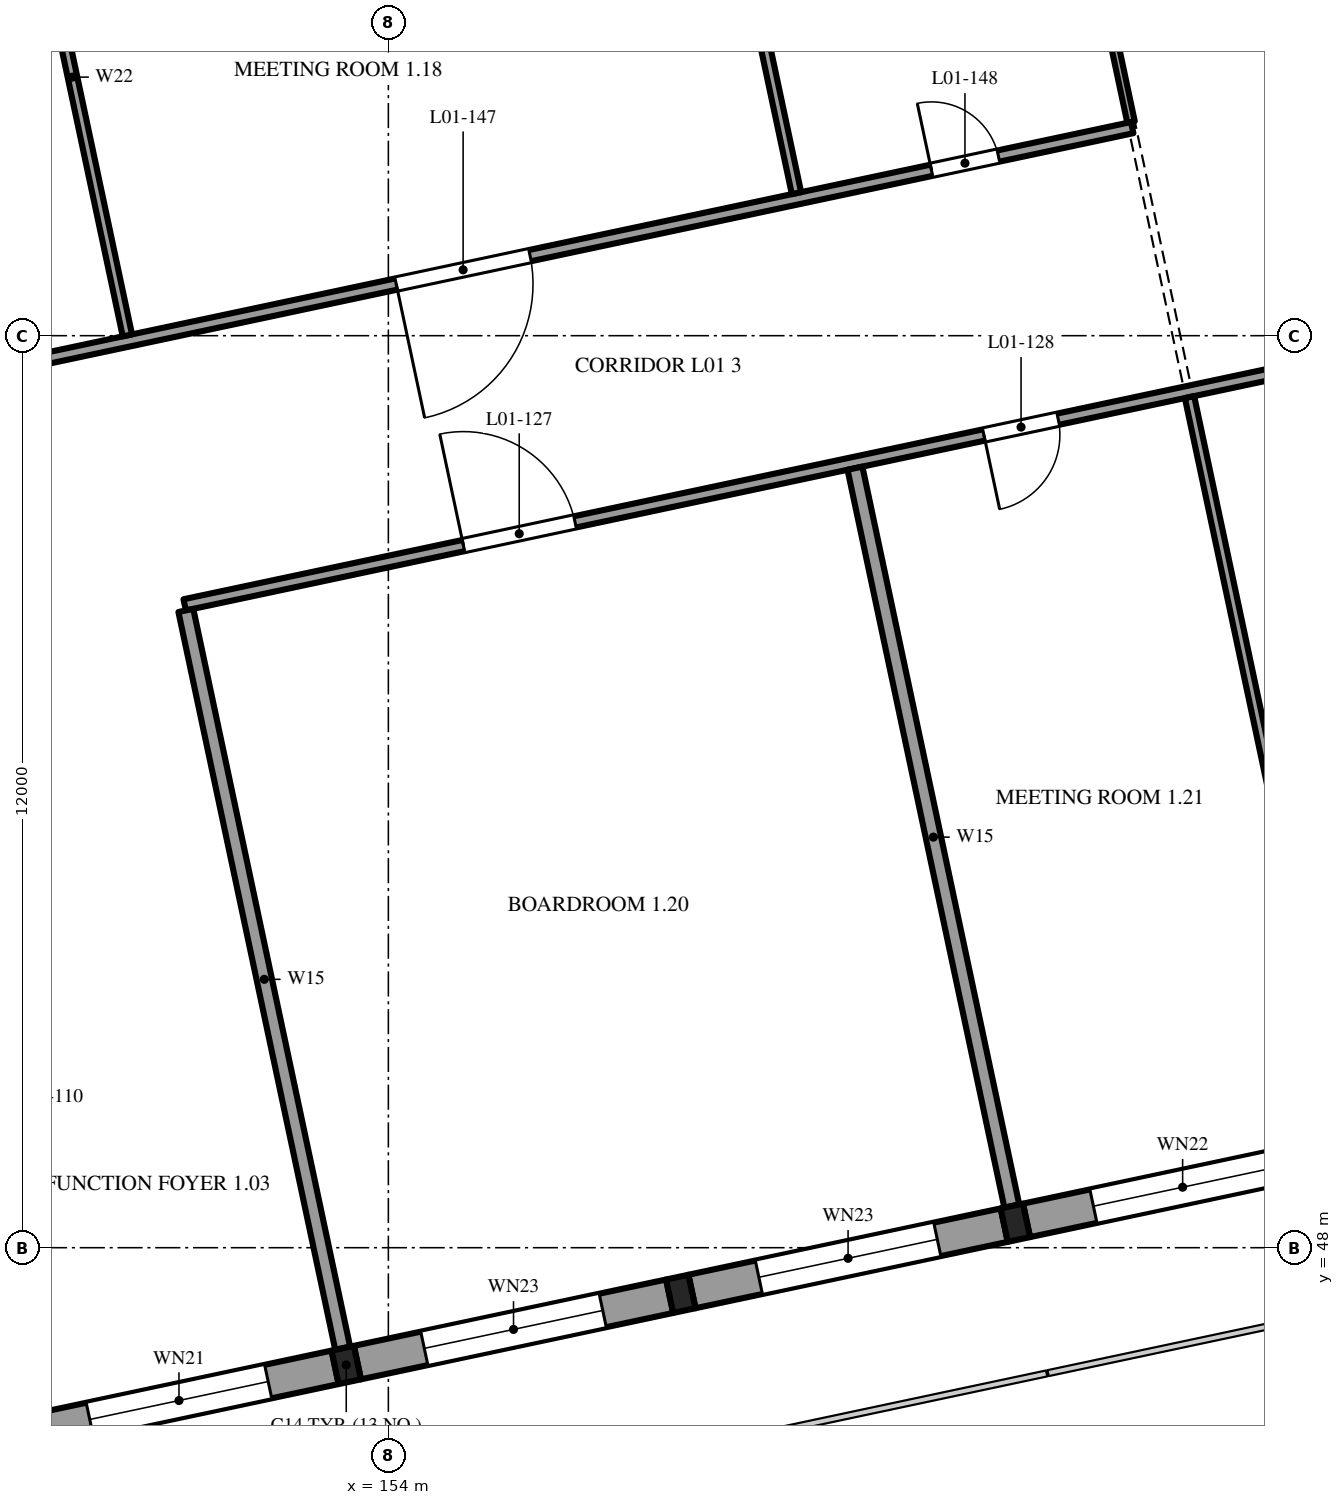
"""IFC4 building model, lengths in metres.
Left out: names, types, materials, properties, quantities, classifications, styles, units other than length and angle.
Written with IfcOpenShell. Run it as: python <this file> out.ifc"""

import sys

from ifc_helpers import new_model, si_unit, direction, frame, frame_2d, origin, origin_2d, place, context, subcontext, project, spatial, rectangle, i_section, extrude, element, fill, save


model = new_model("IFC4")
c1 = context("Model", 3, precision=1e-05, world=origin(), true_north=direction((0.0, 1.0)))
c2 = subcontext(c1, "Body", "Model", "MODEL_VIEW")
j1 = project(units=[si_unit("LENGTHUNIT", "METRE"), si_unit("PLANEANGLEUNIT", "RADIAN")], contexts=[c1])
p1 = place(None, origin())
s1 = spatial("IfcSite", under=j1, at=p1, CompositionType="ELEMENT")
p2 = place(p1, origin())
s2 = spatial("IfcBuilding", under=s1, at=p2, CompositionType="ELEMENT")
p3 = place(p2, frame((0.0, 0.0, 7.2)))
s3 = spatial("IfcBuildingStorey", under=s2, at=p3, CompositionType="ELEMENT", Elevation=7.2)
for number, where, z_axis, x_axis in (
    (1, (153.446, 46.457, 0.0), (0.0, 0.0, 1.0), (0.978, 0.208, 0.0)),
    (2, (157.848, 47.393, 0.0), (0.0, 0.0, 1.0), (0.978, 0.208, 0.0)),
    (3, (162.249, 48.328, 0.0), (0.0, 0.0, 1.0), (0.978, 0.208, 0.0)),
):
    element("IfcColumn", number, at=place(p3, frame(where, z_axis=z_axis, x_axis=x_axis)), inside=s3, PredefinedType="COLUMN", context=c2, shape_type="SweptSolid", body=[
        extrude(i_section(OverallWidth=0.3, OverallDepth=0.45, WebThickness=0.014, FlangeThickness=0.026, FilletRadius=0.027, at=origin_2d()), origin(), (0.0, 0.0, 1.0), 4.8),
    ])
p4 = place(p3, frame((149.191, 45.552, 0.0), z_axis=(0.0, 0.0, 1.0), x_axis=(0.978146440129, 0.207917150959, 0.0)))
e4 = element("IfcWall", 4, at=p4, inside=s3, PredefinedType="SOLIDWALL", context=c2, shape_type="SweptSolid", body=[
    extrude(rectangle(XDim=4.2, YDim=0.45, at=frame_2d((2.1, 0.0))), origin(), (0.0, 0.0, 1.0), 4.35),
])
p5 = place(p4, frame((0.9, 0.0, 0.45)))
e5 = element("IfcOpeningElement", 5, at=p5, cuts=e4, PredefinedType="OPENING", context=c2, shape_type="SweptSolid", body=[
    extrude(rectangle(XDim=2.4, YDim=3.3, at=frame_2d((1.2, 1.65))), frame((0.0, 0.235, 0.0), z_axis=(0.0, -1.0, 0.0), x_axis=(1.0, 0.0, 0.0)), (0.0, 0.0, 1.0), 0.47),
])
p6 = place(p3, frame((153.593, 46.488, 0.0), z_axis=(0.0, 0.0, 1.0), x_axis=(0.978143927149, 0.207928972925, 0.0)))
e6 = element("IfcWall", 6, at=p6, inside=s3, PredefinedType="SOLIDWALL", context=c2, shape_type="SweptSolid", body=[
    extrude(rectangle(XDim=4.2, YDim=0.45, at=frame_2d((2.1, 0.0))), origin(), (0.0, 0.0, 1.0), 4.35),
])
p7 = place(p6, frame((0.9, 0.0, 0.6)))
e7 = element("IfcOpeningElement", 7, at=p7, cuts=e6, PredefinedType="OPENING", context=c2, shape_type="SweptSolid", body=[
    extrude(rectangle(XDim=2.4, YDim=2.7, at=frame_2d((1.2, 1.35))), frame((0.0, 0.235, 0.0), z_axis=(0.0, -1.0, 0.0), x_axis=(1.0, 0.0, 0.0)), (0.0, 0.0, 1.0), 0.47),
])
p8 = place(p3, frame((157.994, 47.424, 0.0), z_axis=(0.0, 0.0, 1.0), x_axis=(0.978143927149, 0.207928972925, 0.0)))
e8 = element("IfcWall", 8, at=p8, inside=s3, PredefinedType="SOLIDWALL", context=c2, shape_type="SweptSolid", body=[
    extrude(rectangle(XDim=4.2, YDim=0.45, at=frame_2d((2.1, 0.0))), origin(), (0.0, 0.0, 1.0), 4.35),
])
p9 = place(p8, frame((0.9, 0.0, 0.6)))
e9 = element("IfcOpeningElement", 9, at=p9, cuts=e8, PredefinedType="OPENING", context=c2, shape_type="SweptSolid", body=[
    extrude(rectangle(XDim=2.4, YDim=2.7, at=frame_2d((1.2, 1.35))), frame((0.0, 0.235, 0.0), z_axis=(0.0, -1.0, 0.0), x_axis=(1.0, 0.0, 0.0)), (0.0, 0.0, 1.0), 0.47),
])
p10 = place(p3, frame((162.396, 48.359, 0.0), z_axis=(0.0, 0.0, 1.0), x_axis=(0.978155748334, 0.207873355681, 0.0)))
e10 = element("IfcWall", 10, at=p10, inside=s3, PredefinedType="SOLIDWALL", context=c2, shape_type="SweptSolid", body=[
    extrude(rectangle(XDim=4.2, YDim=0.45, at=frame_2d((2.1, 0.0))), origin(), (0.0, 0.0, 1.0), 4.35),
])
p11 = place(p10, frame((0.9, 0.0, 0.9)))
e11 = element("IfcOpeningElement", 11, at=p11, cuts=e10, PredefinedType="OPENING", context=c2, shape_type="SweptSolid", body=[
    extrude(rectangle(XDim=2.4, YDim=2.4, at=frame_2d((1.2, 1.2))), frame((0.0, 0.235, 0.0), z_axis=(0.0, -1.0, 0.0), x_axis=(1.0, 0.0, 0.0)), (0.0, 0.0, 1.0), 0.47),
])
p12 = place(p3, frame((151.32, 56.458, 0.0), z_axis=(0.0, 0.0, 1.0), x_axis=(0.97814787394, 0.207910405482, 0.0)))
e12 = element("IfcWall", 12, at=p12, inside=s3, PredefinedType="PARTITIONING", context=c2, shape_type="SweptSolid", body=[
    extrude(rectangle(XDim=45.0, YDim=0.15, at=frame_2d((22.5, 0.0))), origin(), (0.0, 0.0, 1.0), 3.75),
])
p13 = place(p12, frame((3.75, 0.0, 0.0)))
e13 = element("IfcOpeningElement", 13, at=p13, cuts=e12, PredefinedType="OPENING", context=c2, shape_type="SweptSolid", body=[
    extrude(rectangle(XDim=1.5, YDim=2.1, at=frame_2d((0.75, 1.05))), frame((0.0, 0.085, 0.0), z_axis=(0.0, -1.0, 0.0), x_axis=(1.0, 0.0, 0.0)), (0.0, 0.0, 1.0), 0.17),
])
p14 = place(p12, frame((10.75, 0.0, 0.0)))
e14 = element("IfcOpeningElement", 14, at=p14, cuts=e12, PredefinedType="OPENING", context=c2, shape_type="SweptSolid", body=[
    extrude(rectangle(XDim=1.0, YDim=2.1, at=frame_2d((0.5, 1.05))), frame((0.0, 0.085, 0.0), z_axis=(0.0, -1.0, 0.0), x_axis=(1.0, 0.0, 0.0)), (0.0, 0.0, 1.0), 0.17),
])
p15 = place(p12, frame((15.25, 0.0, 0.0)))
e15 = element("IfcOpeningElement", 15, at=p15, cuts=e12, PredefinedType="OPENING", context=c2, shape_type="SweptSolid", body=[
    extrude(rectangle(XDim=1.0, YDim=2.1, at=frame_2d((0.5, 1.05))), frame((0.0, 0.085, 0.0), z_axis=(0.0, -1.0, 0.0), x_axis=(1.0, 0.0, 0.0)), (0.0, 0.0, 1.0), 0.17),
])
p16 = place(p12, frame((19.75, 0.0, 0.0)))
e16 = element("IfcOpeningElement", 16, at=p16, cuts=e12, PredefinedType="OPENING", context=c2, shape_type="SweptSolid", body=[
    extrude(rectangle(XDim=1.0, YDim=2.1, at=frame_2d((0.5, 1.05))), frame((0.0, 0.085, 0.0), z_axis=(0.0, -1.0, 0.0), x_axis=(1.0, 0.0, 0.0)), (0.0, 0.0, 1.0), 0.17),
])
p17 = place(p12, frame((24.25, 0.0, 0.0)))
e17 = element("IfcOpeningElement", 17, at=p17, cuts=e12, PredefinedType="OPENING", context=c2, shape_type="SweptSolid", body=[
    extrude(rectangle(XDim=1.0, YDim=2.1, at=frame_2d((0.5, 1.05))), frame((0.0, 0.085, 0.0), z_axis=(0.0, -1.0, 0.0), x_axis=(1.0, 0.0, 0.0)), (0.0, 0.0, 1.0), 0.17),
])
p18 = place(p12, frame((28.75, 0.0, 0.0)))
e18 = element("IfcOpeningElement", 18, at=p18, cuts=e12, PredefinedType="OPENING", context=c2, shape_type="SweptSolid", body=[
    extrude(rectangle(XDim=1.0, YDim=2.1, at=frame_2d((0.5, 1.05))), frame((0.0, 0.085, 0.0), z_axis=(0.0, -1.0, 0.0), x_axis=(1.0, 0.0, 0.0)), (0.0, 0.0, 1.0), 0.17),
])
p19 = place(p12, frame((33.25, 0.0, 0.0)))
e19 = element("IfcOpeningElement", 19, at=p19, cuts=e12, PredefinedType="OPENING", context=c2, shape_type="SweptSolid", body=[
    extrude(rectangle(XDim=1.0, YDim=2.1, at=frame_2d((0.5, 1.05))), frame((0.0, 0.085, 0.0), z_axis=(0.0, -1.0, 0.0), x_axis=(1.0, 0.0, 0.0)), (0.0, 0.0, 1.0), 0.17),
])
p20 = place(p12, frame((39.6, 0.0, 0.0)))
e20 = element("IfcOpeningElement", 20, at=p20, cuts=e12, PredefinedType="OPENING", context=c2, shape_type="SweptSolid", body=[
    extrude(rectangle(XDim=1.8, YDim=2.1, at=frame_2d((0.9, 1.05))), frame((0.0, 0.085, 0.0), z_axis=(0.0, -1.0, 0.0), x_axis=(1.0, 0.0, 0.0)), (0.0, 0.0, 1.0), 0.17),
])
p21 = place(p3, frame((153.399, 46.677, 0.0), z_axis=(0.0, 0.0, 1.0), x_axis=(-0.20790935802, 0.978148096582, 0.0)))
e21 = element("IfcWall", 21, at=p21, inside=s3, PredefinedType="PARTITIONING", context=c2, shape_type="SweptSolid", body=[
    extrude(rectangle(XDim=9.925, YDim=0.2, at=frame_2d((4.962, 0.0))), origin(), (0.0, 0.0, 1.0), 3.75),
])
p22 = place(p3, frame((162.202, 48.548, 0.0), z_axis=(0.0, 0.0, 1.0), x_axis=(-0.207904355568, 0.978149159861, 0.0)))
e22 = element("IfcWall", 22, at=p22, inside=s3, PredefinedType="PARTITIONING", context=c2, shape_type="SweptSolid", body=[
    extrude(rectangle(XDim=9.925, YDim=0.2, at=frame_2d((4.962, 0.0))), origin(), (0.0, 0.0, 1.0), 3.75),
])
p23 = place(p3, frame((166.604, 49.484, 0.0), z_axis=(0.0, 0.0, 1.0), x_axis=(-0.207932893358, 0.978143093754, 0.0)))
e23 = element("IfcWall", 23, at=p23, inside=s3, PredefinedType="PARTITIONING", context=c2, shape_type="SweptSolid", body=[
    extrude(rectangle(XDim=9.925, YDim=0.125, at=frame_2d((4.962, 0.0))), origin(), (0.0, 0.0, 1.0), 3.75),
])
p24 = place(p3, frame((115.369, 52.446, 0.0), z_axis=(0.0, 0.0, 1.0), x_axis=(0.978147028863, 0.207914381239, 0.0)))
e24 = element("IfcWall", 24, at=p24, inside=s3, PredefinedType="PARTITIONING", context=c2, shape_type="SweptSolid", body=[
    extrude(rectangle(XDim=49.5, YDim=0.15, at=frame_2d((24.75, 0.0))), origin(), (0.0, 0.0, 1.0), 3.75),
])
p25 = place(p24, frame((1.8, 0.0, 0.0)))
e25 = element("IfcOpeningElement", 25, at=p25, cuts=e24, PredefinedType="OPENING", context=c2, shape_type="SweptSolid", body=[
    extrude(rectangle(XDim=0.9, YDim=2.1, at=frame_2d((0.45, 1.05))), frame((0.0, 0.085, 0.0), z_axis=(0.0, -1.0, 0.0), x_axis=(1.0, 0.0, 0.0)), (0.0, 0.0, 1.0), 0.17),
])
p26 = place(p24, frame((6.3, 0.0, 0.0)))
e26 = element("IfcOpeningElement", 26, at=p26, cuts=e24, PredefinedType="OPENING", context=c2, shape_type="SweptSolid", body=[
    extrude(rectangle(XDim=0.9, YDim=2.1, at=frame_2d((0.45, 1.05))), frame((0.0, 0.085, 0.0), z_axis=(0.0, -1.0, 0.0), x_axis=(1.0, 0.0, 0.0)), (0.0, 0.0, 1.0), 0.17),
])
p27 = place(p24, frame((10.7, 0.0, 0.0)))
e27 = element("IfcOpeningElement", 27, at=p27, cuts=e24, PredefinedType="OPENING", context=c2, shape_type="SweptSolid", body=[
    extrude(rectangle(XDim=1.1, YDim=2.1, at=frame_2d((0.55, 1.05))), frame((0.0, 0.085, 0.0), z_axis=(0.0, -1.0, 0.0), x_axis=(1.0, 0.0, 0.0)), (0.0, 0.0, 1.0), 0.17),
])
p28 = place(p24, frame((15.25, 0.0, 0.0)))
e28 = element("IfcOpeningElement", 28, at=p28, cuts=e24, PredefinedType="OPENING", context=c2, shape_type="SweptSolid", body=[
    extrude(rectangle(XDim=1.0, YDim=2.1, at=frame_2d((0.5, 1.05))), frame((0.0, 0.085, 0.0), z_axis=(0.0, -1.0, 0.0), x_axis=(1.0, 0.0, 0.0)), (0.0, 0.0, 1.0), 0.17),
])
p29 = place(p24, frame((19.75, 0.0, 0.0)))
e29 = element("IfcOpeningElement", 29, at=p29, cuts=e24, PredefinedType="OPENING", context=c2, shape_type="SweptSolid", body=[
    extrude(rectangle(XDim=1.0, YDim=2.1, at=frame_2d((0.5, 1.05))), frame((0.0, 0.085, 0.0), z_axis=(0.0, -1.0, 0.0), x_axis=(1.0, 0.0, 0.0)), (0.0, 0.0, 1.0), 0.17),
])
p30 = place(p24, frame((28.35, 0.0, 0.0)))
e30 = element("IfcOpeningElement", 30, at=p30, cuts=e24, PredefinedType="OPENING", context=c2, shape_type="SweptSolid", body=[
    extrude(rectangle(XDim=1.8, YDim=2.1, at=frame_2d((0.9, 1.05))), frame((0.0, 0.085, 0.0), z_axis=(0.0, -1.0, 0.0), x_axis=(1.0, 0.0, 0.0)), (0.0, 0.0, 1.0), 0.17),
])
p31 = place(p24, frame((39.6, 0.0, 0.0)))
e31 = element("IfcOpeningElement", 31, at=p31, cuts=e24, PredefinedType="OPENING", context=c2, shape_type="SweptSolid", body=[
    extrude(rectangle(XDim=1.8, YDim=2.1, at=frame_2d((0.9, 1.05))), frame((0.0, 0.085, 0.0), z_axis=(0.0, -1.0, 0.0), x_axis=(1.0, 0.0, 0.0)), (0.0, 0.0, 1.0), 0.17),
])
p32 = place(p24, frame((46.8, 0.0, 0.0)))
e32 = element("IfcOpeningElement", 32, at=p32, cuts=e24, PredefinedType="OPENING", context=c2, shape_type="SweptSolid", body=[
    extrude(rectangle(XDim=0.9, YDim=2.1, at=frame_2d((0.45, 1.05))), frame((0.0, 0.085, 0.0), z_axis=(0.0, -1.0, 0.0), x_axis=(1.0, 0.0, 0.0)), (0.0, 0.0, 1.0), 0.17),
])
p33 = place(p3, frame((148.503, 69.712, 0.0), z_axis=(0.0, 0.0, 1.0), x_axis=(0.207904355568, -0.978149159861, 0.0)))
e33 = element("IfcWall", 33, at=p33, inside=s3, PredefinedType="PARTITIONING", context=c2, shape_type="SweptSolid", body=[
    extrude(rectangle(XDim=9.925, YDim=0.125, at=frame_2d((4.962, 0.0))), origin(), (0.0, 0.0, 1.0), 3.75),
])
p34 = place(p3, frame((157.306, 71.583, 0.0), z_axis=(0.0, 0.0, 1.0), x_axis=(0.20790935802, -0.978148096582, 0.0)))
e34 = element("IfcWall", 34, at=p34, inside=s3, PredefinedType="PARTITIONING", context=c2, shape_type="SweptSolid", body=[
    extrude(rectangle(XDim=9.925, YDim=0.125, at=frame_2d((4.962, 0.0))), origin(), (0.0, 0.0, 1.0), 3.75),
])
p35 = place(p3, frame((161.708, 72.519, 0.0), z_axis=(0.0, 0.0, 1.0), x_axis=(0.20790935802, -0.978148096582, 0.0)))
e35 = element("IfcWall", 35, at=p35, inside=s3, PredefinedType="PARTITIONING", context=c2, shape_type="SweptSolid", body=[
    extrude(rectangle(XDim=9.925, YDim=0.1, at=frame_2d((4.962, 0.0))), origin(), (0.0, 0.0, 1.0), 3.75),
])
p36 = place(p5, origin())
e36 = element("IfcWindow", 36, at=p36, inside=s3, PartitioningType="DOUBLE_PANEL_VERTICAL", PredefinedType="WINDOW", context=c2, shape_type="SweptSolid", body=[
    extrude(rectangle(XDim=2.4, YDim=3.3, at=frame_2d((1.2, 1.65))), frame((0.0, 0.03, 0.0), z_axis=(0.0, -1.0, 0.0), x_axis=(1.0, 0.0, 0.0)), (0.0, 0.0, 1.0), 0.06),
])
fill(e5, e36)
p37 = place(p7, origin())
e37 = element("IfcWindow", 37, at=p37, inside=s3, PartitioningType="SINGLE_PANEL", PredefinedType="WINDOW", context=c2, shape_type="SweptSolid", body=[
    extrude(rectangle(XDim=2.4, YDim=2.7, at=frame_2d((1.2, 1.35))), frame((0.0, 0.03, 0.0), z_axis=(0.0, -1.0, 0.0), x_axis=(1.0, 0.0, 0.0)), (0.0, 0.0, 1.0), 0.06),
])
fill(e7, e37)
p38 = place(p9, origin())
e38 = element("IfcWindow", 38, at=p38, inside=s3, PartitioningType="SINGLE_PANEL", PredefinedType="WINDOW", context=c2, shape_type="SweptSolid", body=[
    extrude(rectangle(XDim=2.4, YDim=2.7, at=frame_2d((1.2, 1.35))), frame((0.0, 0.03, 0.0), z_axis=(0.0, -1.0, 0.0), x_axis=(1.0, 0.0, 0.0)), (0.0, 0.0, 1.0), 0.06),
])
fill(e9, e38)
p39 = place(p11, origin())
e39 = element("IfcWindow", 39, at=p39, inside=s3, PartitioningType="SINGLE_PANEL", PredefinedType="WINDOW", context=c2, shape_type="SweptSolid", body=[
    extrude(rectangle(XDim=2.4, YDim=2.4, at=frame_2d((1.2, 1.2))), frame((0.0, 0.03, 0.0), z_axis=(0.0, -1.0, 0.0), x_axis=(1.0, 0.0, 0.0)), (0.0, 0.0, 1.0), 0.06),
])
fill(e11, e39)
p40 = place(p13, origin())
e40 = element("IfcDoor", 40, at=p40, inside=s3, OperationType="DOUBLE_DOOR_SINGLE_SWING", PredefinedType="DOOR", context=c2, shape_type="SweptSolid", body=[
    extrude(rectangle(XDim=1.5, YDim=2.1, at=frame_2d((0.75, 1.05))), frame((0.0, 0.025, 0.0), z_axis=(0.0, -1.0, 0.0), x_axis=(1.0, 0.0, 0.0)), (0.0, 0.0, 1.0), 0.05),
])
fill(e13, e40)
p41 = place(p14, frame((1.0, 0.0, 0.0), z_axis=(0.0, 0.0, 1.0), x_axis=(-1.0, 0.0, 0.0)))
e41 = element("IfcDoor", 41, at=p41, inside=s3, OperationType="SINGLE_SWING_LEFT", PredefinedType="DOOR", context=c2, shape_type="SweptSolid", body=[
    extrude(rectangle(XDim=1.0, YDim=2.1, at=frame_2d((0.5, 1.05))), frame((0.0, 0.025, 0.0), z_axis=(0.0, -1.0, 0.0), x_axis=(1.0, 0.0, 0.0)), (0.0, 0.0, 1.0), 0.05),
])
fill(e14, e41)
p42 = place(p31, frame((1.8, 0.0, 0.0), z_axis=(0.0, 0.0, 1.0), x_axis=(-1.0, 0.0, 0.0)))
e42 = element("IfcDoor", 42, at=p42, inside=s3, OperationType="DOUBLE_DOOR_SINGLE_SWING", PredefinedType="DOOR", context=c2, shape_type="SweptSolid", body=[
    extrude(rectangle(XDim=1.8, YDim=2.1, at=frame_2d((0.9, 1.05))), frame((0.0, 0.025, 0.0), z_axis=(0.0, -1.0, 0.0), x_axis=(1.0, 0.0, 0.0)), (0.0, 0.0, 1.0), 0.05),
])
fill(e31, e42)
p43 = place(p32, origin())
e43 = element("IfcDoor", 43, at=p43, inside=s3, OperationType="SINGLE_SWING_RIGHT", PredefinedType="DOOR", context=c2, shape_type="SweptSolid", body=[
    extrude(rectangle(XDim=0.9, YDim=2.1, at=frame_2d((0.45, 1.05))), frame((0.0, 0.025, 0.0), z_axis=(0.0, -1.0, 0.0), x_axis=(1.0, 0.0, 0.0)), (0.0, 0.0, 1.0), 0.05),
])
fill(e32, e43)
save(model, sys.argv[1])
